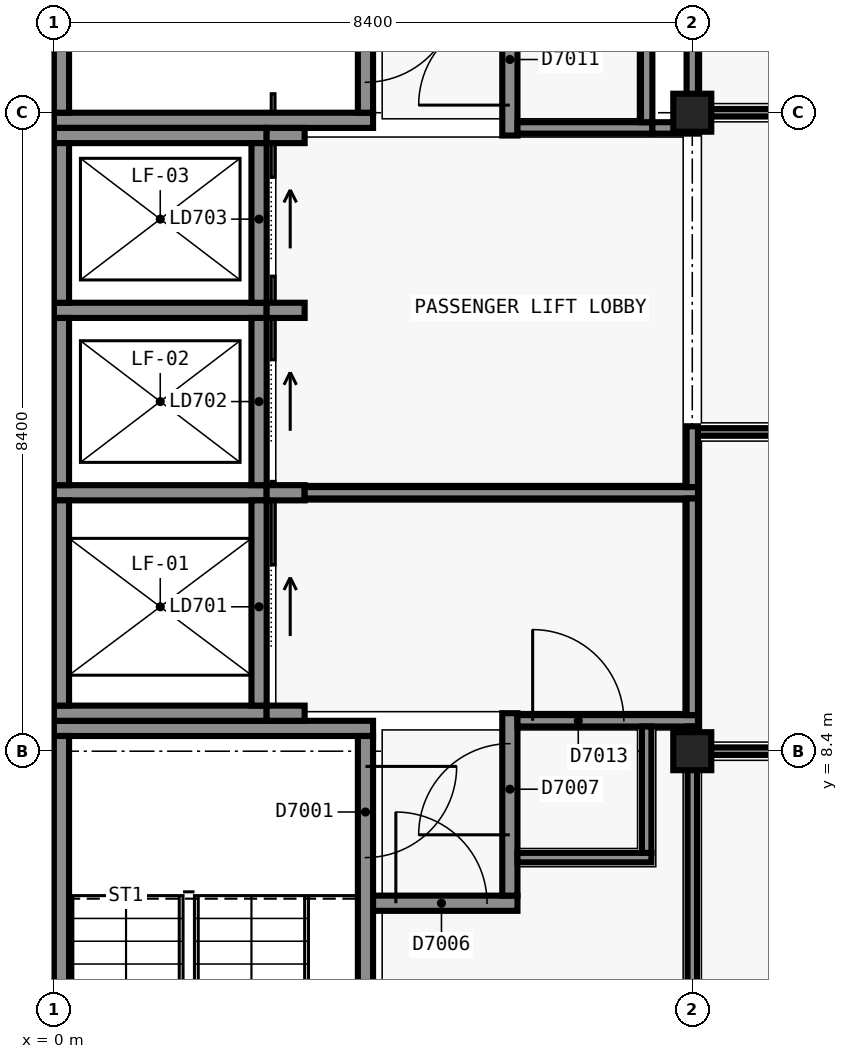
"""IFC4 building model, lengths in metres.
Left out: names, types, materials, properties, quantities, classifications, styles, units other than length and angle.
Written with IfcOpenShell. Run it as: python <this file> out.ifc"""

import sys

from ifc_helpers import new_model, si_unit, direction, frame, frame_2d, origin, origin_2d, place, context, subcontext, project, spatial, rectangle, extrude, element, fill, save


model = new_model("IFC4")
c1 = context("Model", 3, precision=1e-05, world=origin(), true_north=direction((0.0, 1.0)))
c2 = subcontext(c1, "Body", "Model", "MODEL_VIEW")
j1 = project(units=[si_unit("LENGTHUNIT", "METRE"), si_unit("PLANEANGLEUNIT", "RADIAN")], contexts=[c1])
p1 = place(None, origin())
s1 = spatial("IfcSite", under=j1, at=p1, CompositionType="ELEMENT")
p2 = place(p1, origin())
s2 = spatial("IfcBuilding", under=s1, at=p2, CompositionType="ELEMENT")
p3 = place(p2, frame((0.0, 0.0, 33.6)))
s3 = spatial("IfcBuildingStorey", under=s2, at=p3, CompositionType="ELEMENT", Elevation=33.6)
p4 = place(p3, frame((0.0, 8.7, 0.0), z_axis=(0.0, 0.0, 1.0), x_axis=(1.0, 0.0, 0.0)))
e1 = element("IfcWall", 1, at=p4, inside=s3, PredefinedType="SHEAR", context=c2, shape_type="SweptSolid", body=[
    extrude(rectangle(XDim=4.199, YDim=0.2, at=frame_2d((2.1, 0.0))), origin(), (0.0, 0.0, 1.0), 4.5),
])
p5 = place(p3, frame((0.1, 0.2, 0.0), z_axis=(0.0, 0.0, 1.0), x_axis=(0.0, 1.0, 0.0)))
e2 = element("IfcWall", 2, at=p5, inside=s3, PredefinedType="SHEAR", context=c2, shape_type="SweptSolid", body=[
    extrude(rectangle(XDim=8.4, YDim=0.2, at=frame_2d((4.2, 0.0))), origin(), (0.0, 0.0, 1.0), 4.5),
])
p6 = place(p3, frame((4.1, 8.6, 0.0), z_axis=(0.0, 0.0, 1.0), x_axis=(0.0, -1.0, 0.0)))
e3 = element("IfcWall", 3, at=p6, inside=s3, PredefinedType="SHEAR", context=c2, shape_type="SweptSolid", body=[
    extrude(rectangle(XDim=8.4, YDim=0.2, at=frame_2d((4.2, 0.0))), origin(), (0.0, 0.0, 1.0), 4.5),
])
p7 = place(p6, frame((0.4, 0.0, 0.0)))
e4 = element("IfcOpeningElement", 4, at=p7, cuts=e3, PredefinedType="OPENING", context=c2, shape_type="SweptSolid", body=[
    extrude(rectangle(XDim=1.2, YDim=2.1, at=frame_2d((0.6, 1.05))), frame((0.0, 0.11, 0.0), z_axis=(0.0, -1.0, 0.0), x_axis=(1.0, 0.0, 0.0)), (0.0, 0.0, 1.0), 0.22),
])
p8 = place(p3, frame((4.2, 16.7, 0.0), z_axis=(0.0, 0.0, 1.0), x_axis=(-1.0, 0.0, 0.0)))
e5 = element("IfcWall", 5, at=p8, inside=s3, PredefinedType="SHEAR", context=c2, shape_type="SweptSolid", body=[
    extrude(rectangle(XDim=4.199, YDim=0.2, at=frame_2d((2.1, 0.0))), origin(), (0.0, 0.0, 1.0), 4.5),
])
p9 = place(p3, frame((0.1, 16.8, 0.0), z_axis=(0.0, 0.0, 1.0), x_axis=(0.0, 1.0, 0.0)))
e6 = element("IfcWall", 6, at=p9, inside=s3, PredefinedType="SHEAR", context=c2, shape_type="SweptSolid", body=[
    extrude(rectangle(XDim=8.2, YDim=0.2, at=frame_2d((4.1, 0.0))), origin(), (0.0, 0.0, 1.0), 4.5),
])
p10 = place(p3, frame((4.1, 25.0, 0.0), z_axis=(0.0, 0.0, 1.0), x_axis=(0.0, -1.0, 0.0)))
e7 = element("IfcWall", 7, at=p10, inside=s3, PredefinedType="SHEAR", context=c2, shape_type="SweptSolid", body=[
    extrude(rectangle(XDim=8.2, YDim=0.2, at=frame_2d((4.1, 0.0))), origin(), (0.0, 0.0, 1.0), 4.5),
])
p11 = place(p10, frame((6.6, 0.0, 0.0)))
e8 = element("IfcOpeningElement", 8, at=p11, cuts=e7, PredefinedType="OPENING", context=c2, shape_type="SweptSolid", body=[
    extrude(rectangle(XDim=1.2, YDim=2.1, at=frame_2d((0.6, 1.05))), frame((0.0, 0.11, 0.0), z_axis=(0.0, -1.0, 0.0), x_axis=(1.0, 0.0, 0.0)), (0.0, 0.0, 1.0), 0.22),
])
for number, where, z_axis, x_axis in (
    (9, (2.8, 8.9, 0.0), (0.0, 0.0, 1.0), (-1.0, 0.0, 0.0)),
    (10, (0.0, 11.8, 0.0), (0.0, 0.0, 1.0), (1.0, 0.0, 0.0)),
):
    element("IfcWall", number, at=place(p3, frame(where, z_axis=z_axis, x_axis=x_axis)), inside=s3, PredefinedType="SHEAR", context=c2, shape_type="SweptSolid", body=[
        extrude(rectangle(XDim=2.8, YDim=0.2, at=frame_2d((1.4, 0.0))), origin(), (0.0, 0.0, 1.0), 4.5),
    ])
p12 = place(p3, frame((0.1, 9.0, 0.0), z_axis=(0.0, 0.0, 1.0), x_axis=(0.0, 1.0, 0.0)))
e11 = element("IfcWall", 11, at=p12, inside=s3, PredefinedType="SHEAR", context=c2, shape_type="SweptSolid", body=[
    extrude(rectangle(XDim=2.7, YDim=0.2, at=frame_2d((1.35, 0.0))), origin(), (0.0, 0.0, 1.0), 4.5),
])
p13 = place(p3, frame((2.7, 11.7, 0.0), z_axis=(0.0, 0.0, 1.0), x_axis=(0.0, -1.0, 0.0)))
e12 = element("IfcWall", 12, at=p13, inside=s3, PredefinedType="SHEAR", context=c2, shape_type="SweptSolid", body=[
    extrude(rectangle(XDim=2.7, YDim=0.2, at=frame_2d((1.35, 0.0))), origin(), (0.0, 0.0, 1.0), 4.5),
])
p14 = place(p13, frame((0.85, 0.0, 0.0)))
e13 = element("IfcOpeningElement", 13, at=p14, cuts=e12, PredefinedType="OPENING", context=c2, shape_type="SweptSolid", body=[
    extrude(rectangle(XDim=1.1, YDim=2.1, at=frame_2d((0.55, 1.05))), frame((0.0, 0.11, 0.0), z_axis=(0.0, -1.0, 0.0), x_axis=(1.0, 0.0, 0.0)), (0.0, 0.0, 1.0), 0.22),
])
p15 = place(p3, frame((0.0, 14.2, 0.0), z_axis=(0.0, 0.0, 1.0), x_axis=(1.0, 0.0, 0.0)))
e14 = element("IfcWall", 14, at=p15, inside=s3, PredefinedType="SHEAR", context=c2, shape_type="SweptSolid", body=[
    extrude(rectangle(XDim=2.8, YDim=0.2, at=frame_2d((1.4, 0.0))), origin(), (0.0, 0.0, 1.0), 4.5),
])
p16 = place(p3, frame((0.1, 11.9, 0.0), z_axis=(0.0, 0.0, 1.0), x_axis=(0.0, 1.0, 0.0)))
e15 = element("IfcWall", 15, at=p16, inside=s3, PredefinedType="SHEAR", context=c2, shape_type="SweptSolid", body=[
    extrude(rectangle(XDim=2.2, YDim=0.2, at=frame_2d((1.1, 0.0))), origin(), (0.0, 0.0, 1.0), 4.5),
])
p17 = place(p3, frame((2.7, 14.1, 0.0), z_axis=(0.0, 0.0, 1.0), x_axis=(0.0, -1.0, 0.0)))
e16 = element("IfcWall", 16, at=p17, inside=s3, PredefinedType="SHEAR", context=c2, shape_type="SweptSolid", body=[
    extrude(rectangle(XDim=2.2, YDim=0.2, at=frame_2d((1.1, 0.0))), origin(), (0.0, 0.0, 1.0), 4.5),
])
p18 = place(p17, frame((0.55, 0.0, 0.0)))
e17 = element("IfcOpeningElement", 17, at=p18, cuts=e16, PredefinedType="OPENING", context=c2, shape_type="SweptSolid", body=[
    extrude(rectangle(XDim=1.1, YDim=2.1, at=frame_2d((0.55, 1.05))), frame((0.0, 0.11, 0.0), z_axis=(0.0, -1.0, 0.0), x_axis=(1.0, 0.0, 0.0)), (0.0, 0.0, 1.0), 0.22),
])
p19 = place(p3, frame((0.0, 16.5, 0.0), z_axis=(0.0, 0.0, 1.0), x_axis=(1.0, 0.0, 0.0)))
e18 = element("IfcWall", 18, at=p19, inside=s3, PredefinedType="SHEAR", context=c2, shape_type="SweptSolid", body=[
    extrude(rectangle(XDim=2.8, YDim=0.2, at=frame_2d((1.4, 0.0))), origin(), (0.0, 0.0, 1.0), 4.5),
])
p20 = place(p3, frame((0.1, 14.3, 0.0), z_axis=(0.0, 0.0, 1.0), x_axis=(0.0, 1.0, 0.0)))
e19 = element("IfcWall", 19, at=p20, inside=s3, PredefinedType="SHEAR", context=c2, shape_type="SweptSolid", body=[
    extrude(rectangle(XDim=2.1, YDim=0.2, at=frame_2d((1.05, 0.0))), origin(), (0.0, 0.0, 1.0), 4.5),
])
p21 = place(p3, frame((2.7, 16.4, 0.0), z_axis=(0.0, 0.0, 1.0), x_axis=(0.0, -1.0, 0.0)))
e20 = element("IfcWall", 20, at=p21, inside=s3, PredefinedType="SHEAR", context=c2, shape_type="SweptSolid", body=[
    extrude(rectangle(XDim=2.1, YDim=0.2, at=frame_2d((1.05, 0.0))), origin(), (0.0, 0.0, 1.0), 4.5),
])
p22 = place(p21, frame((0.45, 0.0, 0.0)))
e21 = element("IfcOpeningElement", 21, at=p22, cuts=e20, PredefinedType="OPENING", context=c2, shape_type="SweptSolid", body=[
    extrude(rectangle(XDim=1.1, YDim=2.1, at=frame_2d((0.55, 1.05))), frame((0.0, 0.11, 0.0), z_axis=(0.0, -1.0, 0.0), x_axis=(1.0, 0.0, 0.0)), (0.0, 0.0, 1.0), 0.22),
])
for number, where, z_axis, x_axis in (
    (22, (8.4, 8.4, 0.0), (0.0, 0.0, 1.0), (1.0, 0.0, 0.0)),
    (23, (8.4, 16.8, 0.0), (0.0, 0.0, 1.0), (1.0, 0.0, 0.0)),
):
    element("IfcColumn", number, at=place(p3, frame(where, z_axis=z_axis, x_axis=x_axis)), inside=s3, PredefinedType="COLUMN", context=c2, shape_type="SweptSolid", body=[
        extrude(rectangle(XDim=0.5, YDim=0.5, at=origin_2d()), origin(), (0.0, 0.0, 1.0), 4.5),
    ])
for number, where, z_axis, x_axis in (
    (24, (3.3, 8.9, 0.0), (0.0, 0.0, 1.0), (-1.0, 0.0, 0.0)),
    (25, (2.8, 11.8, 0.0), (0.0, 0.0, 1.0), (1.0, 0.0, 0.0)),
    (26, (2.8, 14.2, 0.0), (0.0, 0.0, 1.0), (1.0, 0.0, 0.0)),
    (27, (2.8, 16.5, 0.0), (0.0, 0.0, 1.0), (1.0, 0.0, 0.0)),
):
    element("IfcWall", number, at=place(p3, frame(where, z_axis=z_axis, x_axis=x_axis)), inside=s3, PredefinedType="SHEAR", context=c2, shape_type="SweptSolid", body=[
        extrude(rectangle(XDim=0.5, YDim=0.2, at=frame_2d((0.25, 0.0))), origin(), (0.0, 0.0, 1.0), 4.5),
    ])
p23 = place(p3, frame((4.2, 6.4, 0.0), z_axis=(0.0, 0.0, 1.0), x_axis=(1.0, 0.0, 0.0)))
e28 = element("IfcWall", 28, at=p23, inside=s3, PredefinedType="SOLIDWALL", context=c2, shape_type="SweptSolid", body=[
    extrude(rectangle(XDim=1.9, YDim=0.2, at=frame_2d((0.95, 0.0))), origin(), (0.0, 0.0, 1.0), 4.2),
])
p24 = place(p23, frame((0.3, 0.0, 0.0)))
e29 = element("IfcOpeningElement", 29, at=p24, cuts=e28, PredefinedType="OPENING", context=c2, shape_type="SweptSolid", body=[
    extrude(rectangle(XDim=1.2, YDim=2.1, at=frame_2d((0.6, 1.05))), frame((0.0, 0.11, 0.0), z_axis=(0.0, -1.0, 0.0), x_axis=(1.0, 0.0, 0.0)), (0.0, 0.0, 1.0), 0.22),
])
p25 = place(p3, frame((6.0, 6.5, 0.0), z_axis=(0.0, 0.0, 1.0), x_axis=(0.0, 1.0, 0.0)))
e30 = element("IfcWall", 30, at=p25, inside=s3, PredefinedType="SOLIDWALL", context=c2, shape_type="SweptSolid", body=[
    extrude(rectangle(XDim=2.4, YDim=0.2, at=frame_2d((1.2, 0.0))), origin(), (0.0, 0.0, 1.0), 3.7),
])
p26 = place(p25, frame((0.8, 0.0, 0.0)))
e31 = element("IfcOpeningElement", 31, at=p26, cuts=e30, PredefinedType="OPENING", context=c2, shape_type="SweptSolid", body=[
    extrude(rectangle(XDim=1.2, YDim=2.1, at=frame_2d((0.6, 1.05))), frame((0.0, 0.11, 0.0), z_axis=(0.0, -1.0, 0.0), x_axis=(1.0, 0.0, 0.0)), (0.0, 0.0, 1.0), 0.22),
])
p27 = place(p3, frame((6.0, 16.5, 0.0), z_axis=(0.0, 0.0, 1.0), x_axis=(0.0, 1.0, 0.0)))
e32 = element("IfcWall", 32, at=p27, inside=s3, PredefinedType="SOLIDWALL", context=c2, shape_type="SweptSolid", body=[
    extrude(rectangle(XDim=2.4, YDim=0.2, at=frame_2d((1.2, 0.0))), origin(), (0.0, 0.0, 1.0), 3.7),
])
p28 = place(p27, frame((0.4, 0.0, 0.0)))
e33 = element("IfcOpeningElement", 33, at=p28, cuts=e32, PredefinedType="OPENING", context=c2, shape_type="SweptSolid", body=[
    extrude(rectangle(XDim=1.2, YDim=2.1, at=frame_2d((0.6, 1.05))), frame((0.0, 0.11, 0.0), z_axis=(0.0, -1.0, 0.0), x_axis=(1.0, 0.0, 0.0)), (0.0, 0.0, 1.0), 0.22),
])
p29 = place(p3, frame((6.1, 16.6, 0.0), z_axis=(0.0, 0.0, 1.0), x_axis=(1.0, 0.0, 0.0)))
e34 = element("IfcWall", 34, at=p29, inside=s3, PredefinedType="PARTITIONING", context=c2, shape_type="SweptSolid", body=[
    extrude(rectangle(XDim=1.775, YDim=0.15, at=frame_2d((0.887, 0.0))), origin(), (0.0, 0.0, 1.0), 3.7),
])
p30 = place(p3, frame((6.1, 8.8, 0.0), z_axis=(0.0, 0.0, 1.0), x_axis=(1.0, 0.0, 0.0)))
e35 = element("IfcWall", 35, at=p30, inside=s3, PredefinedType="SOLIDWALL", context=c2, shape_type="SweptSolid", body=[
    extrude(rectangle(XDim=2.375, YDim=0.15, at=frame_2d((1.188, 0.0))), origin(), (0.0, 0.0, 1.0), 3.5),
])
p31 = place(p30, frame((0.2, 0.0, 0.0)))
e36 = element("IfcOpeningElement", 36, at=p31, cuts=e35, PredefinedType="OPENING", context=c2, shape_type="SweptSolid", body=[
    extrude(rectangle(XDim=1.2, YDim=2.1, at=frame_2d((0.6, 1.05))), frame((0.0, 0.085, 0.0), z_axis=(0.0, -1.0, 0.0), x_axis=(1.0, 0.0, 0.0)), (0.0, 0.0, 1.0), 0.17),
])
p32 = place(p3, frame((3.3, 11.8, 0.0), z_axis=(0.0, 0.0, 1.0), x_axis=(1.0, 0.0, 0.0)))
e37 = element("IfcWall", 37, at=p32, inside=s3, PredefinedType="SOLIDWALL", context=c2, shape_type="SweptSolid", body=[
    extrude(rectangle(XDim=5.175, YDim=0.15, at=frame_2d((2.587, 0.0))), origin(), (0.0, 0.0, 1.0), 3.5),
])
p33 = place(p3, frame((7.875, 16.6, 0.0), z_axis=(0.0, 0.0, 1.0), x_axis=(1.0, 0.0, 0.0)))
e38 = element("IfcWall", 38, at=p33, inside=s3, PredefinedType="SOLIDWALL", context=c2, shape_type="SweptSolid", body=[
    extrude(rectangle(XDim=0.6, YDim=0.15, at=frame_2d((0.3, 0.0))), origin(), (0.0, 0.0, 1.0), 3.5),
])
p34 = place(p3, frame((8.4, 11.875, 0.0), z_axis=(0.0, 0.0, 1.0), x_axis=(0.0, 1.0, 0.0)))
e39 = element("IfcWall", 39, at=p34, inside=s3, PredefinedType="PARTITIONING", context=c2, shape_type="SweptSolid", body=[
    extrude(rectangle(XDim=0.8, YDim=0.15, at=frame_2d((0.4, 0.0))), origin(), (0.0, 0.0, 1.0), 3.5),
])
p35 = place(p3, frame((8.4, 8.875, 0.0), z_axis=(0.0, 0.0, 1.0), x_axis=(0.0, 1.0, 0.0)))
e40 = element("IfcWall", 40, at=p35, inside=s3, PredefinedType="SOLIDWALL", context=c2, shape_type="SweptSolid", body=[
    extrude(rectangle(XDim=2.85, YDim=0.15, at=frame_2d((1.425, 0.0))), origin(), (0.0, 0.0, 1.0), 3.5),
])
p36 = place(p3, frame((7.8, 16.675, 0.0), z_axis=(0.0, 0.0, 1.0), x_axis=(0.0, 1.0, 0.0)))
e41 = element("IfcWall", 41, at=p36, inside=s3, PredefinedType="SOLIDWALL", context=c2, shape_type="SweptSolid", body=[
    extrude(rectangle(XDim=1.65, YDim=0.15, at=frame_2d((0.825, 0.0))), origin(), (0.0, 0.0, 1.0), 3.7),
])
p37 = place(p3, frame((8.4, 16.675, 0.0), z_axis=(0.0, 0.0, 1.0), x_axis=(0.0, 1.0, 0.0)))
e42 = element("IfcWall", 42, at=p37, inside=s3, PredefinedType="SOLIDWALL", context=c2, shape_type="SweptSolid", body=[
    extrude(rectangle(XDim=7.775, YDim=0.15, at=frame_2d((3.887, 0.0))), origin(), (0.0, 0.0, 1.0), 3.5),
])
p38 = place(p3, frame((6.1, 7.0, 0.0), z_axis=(0.0, 0.0, 1.0), x_axis=(1.0, 0.0, 0.0)))
e43 = element("IfcWall", 43, at=p38, inside=s3, PredefinedType="PARTITIONING", context=c2, shape_type="SweptSolid", body=[
    extrude(rectangle(XDim=1.762, YDim=0.125, at=frame_2d((0.881, 0.0))), origin(), (0.0, 0.0, 1.0), 4.2),
])
p39 = place(p3, frame((7.8, 7.062, 0.0), z_axis=(0.0, 0.0, 1.0), x_axis=(0.0, 1.0, 0.0)))
e44 = element("IfcWall", 44, at=p39, inside=s3, PredefinedType="PARTITIONING", context=c2, shape_type="SweptSolid", body=[
    extrude(rectangle(XDim=1.663, YDim=0.125, at=frame_2d((0.831, 0.0))), origin(), (0.0, 0.0, 1.0), 3.7),
])
p40 = place(p3, frame((8.4, 0.75, 0.0), z_axis=(0.0, 0.0, 1.0), x_axis=(0.0, 1.0, 0.0)))
e45 = element("IfcWall", 45, at=p40, inside=s3, PredefinedType="PARTITIONING", context=c2, shape_type="SweptSolid", body=[
    extrude(rectangle(XDim=7.975, YDim=0.125, at=frame_2d((3.988, 0.0))), origin(), (0.0, 0.0, 1.0), 3.5),
])
p41 = place(p3, frame((8.462, 8.4, 0.0), z_axis=(0.0, 0.0, 1.0), x_axis=(1.0, 0.0, 0.0)))
e46 = element("IfcWall", 46, at=p41, inside=s3, PredefinedType="PARTITIONING", context=c2, shape_type="SweptSolid", body=[
    extrude(rectangle(XDim=16.663, YDim=0.1, at=frame_2d((8.331, 0.0))), origin(), (0.0, 0.0, 1.0), 3.5),
])
p42 = place(p41, frame((3.637, 0.0, 0.0)))
e47 = element("IfcOpeningElement", 47, at=p42, cuts=e46, PredefinedType="OPENING", context=c2, shape_type="SweptSolid", body=[
    extrude(rectangle(XDim=1.0, YDim=2.1, at=frame_2d((0.5, 1.05))), frame((0.0, 0.06, 0.0), z_axis=(0.0, -1.0, 0.0), x_axis=(1.0, 0.0, 0.0)), (0.0, 0.0, 1.0), 0.12),
])
p43 = place(p3, frame((8.475, 12.6, 0.0), z_axis=(0.0, 0.0, 1.0), x_axis=(1.0, 0.0, 0.0)))
e48 = element("IfcWall", 48, at=p43, inside=s3, PredefinedType="PARTITIONING", context=c2, shape_type="SweptSolid", body=[
    extrude(rectangle(XDim=16.65, YDim=0.1, at=frame_2d((8.325, 0.0))), origin(), (0.0, 0.0, 1.0), 3.5),
])
p44 = place(p3, frame((8.475, 16.8, 0.0), z_axis=(0.0, 0.0, 1.0), x_axis=(1.0, 0.0, 0.0)))
e49 = element("IfcWall", 49, at=p44, inside=s3, PredefinedType="PARTITIONING", context=c2, shape_type="SweptSolid", body=[
    extrude(rectangle(XDim=16.65, YDim=0.1, at=frame_2d((8.325, 0.0))), origin(), (0.0, 0.0, 1.0), 3.5),
])
p45 = place(p44, frame((5.725, 0.0, 0.0)))
e50 = element("IfcOpeningElement", 50, at=p45, cuts=e49, PredefinedType="OPENING", context=c2, shape_type="SweptSolid", body=[
    extrude(rectangle(XDim=1.0, YDim=2.1, at=frame_2d((0.5, 1.05))), frame((0.0, 0.06, 0.0), z_axis=(0.0, -1.0, 0.0), x_axis=(1.0, 0.0, 0.0)), (0.0, 0.0, 1.0), 0.12),
])
p46 = place(p14, origin())
e51 = element("IfcDoor", 51, at=p46, inside=s3, OperationType="SLIDING_TO_LEFT", PredefinedType="DOOR", context=c2, shape_type="SweptSolid", body=[
    extrude(rectangle(XDim=1.1, YDim=2.1, at=frame_2d((0.55, 1.05))), frame((0.0, 0.025, 0.0), z_axis=(0.0, -1.0, 0.0), x_axis=(1.0, 0.0, 0.0)), (0.0, 0.0, 1.0), 0.05),
])
fill(e13, e51)
p47 = place(p18, origin())
e52 = element("IfcDoor", 52, at=p47, inside=s3, OperationType="SLIDING_TO_LEFT", PredefinedType="DOOR", context=c2, shape_type="SweptSolid", body=[
    extrude(rectangle(XDim=1.1, YDim=2.1, at=frame_2d((0.55, 1.05))), frame((0.0, 0.025, 0.0), z_axis=(0.0, -1.0, 0.0), x_axis=(1.0, 0.0, 0.0)), (0.0, 0.0, 1.0), 0.05),
])
fill(e17, e52)
p48 = place(p22, origin())
e53 = element("IfcDoor", 53, at=p48, inside=s3, OperationType="SLIDING_TO_LEFT", PredefinedType="DOOR", context=c2, shape_type="SweptSolid", body=[
    extrude(rectangle(XDim=1.1, YDim=2.1, at=frame_2d((0.55, 1.05))), frame((0.0, 0.025, 0.0), z_axis=(0.0, -1.0, 0.0), x_axis=(1.0, 0.0, 0.0)), (0.0, 0.0, 1.0), 0.05),
])
fill(e21, e53)
p49 = place(p7, origin())
e54 = element("IfcDoor", 54, at=p49, inside=s3, OperationType="SINGLE_SWING_RIGHT", PredefinedType="DOOR", context=c2, shape_type="SweptSolid", body=[
    extrude(rectangle(XDim=1.2, YDim=2.1, at=frame_2d((0.6, 1.05))), frame((0.0, 0.025, 0.0), z_axis=(0.0, -1.0, 0.0), x_axis=(1.0, 0.0, 0.0)), (0.0, 0.0, 1.0), 0.05),
])
fill(e4, e54)
p50 = place(p11, origin())
e55 = element("IfcDoor", 55, at=p50, inside=s3, OperationType="SINGLE_SWING_RIGHT", PredefinedType="DOOR", context=c2, shape_type="SweptSolid", body=[
    extrude(rectangle(XDim=1.2, YDim=2.1, at=frame_2d((0.6, 1.05))), frame((0.0, 0.025, 0.0), z_axis=(0.0, -1.0, 0.0), x_axis=(1.0, 0.0, 0.0)), (0.0, 0.0, 1.0), 0.05),
])
fill(e8, e55)
p51 = place(p24, origin())
e56 = element("IfcDoor", 56, at=p51, inside=s3, OperationType="SINGLE_SWING_LEFT", PredefinedType="DOOR", context=c2, shape_type="SweptSolid", body=[
    extrude(rectangle(XDim=1.2, YDim=2.1, at=frame_2d((0.6, 1.05))), frame((0.0, 0.025, 0.0), z_axis=(0.0, -1.0, 0.0), x_axis=(1.0, 0.0, 0.0)), (0.0, 0.0, 1.0), 0.05),
])
fill(e29, e56)
p52 = place(p26, origin())
e57 = element("IfcDoor", 57, at=p52, inside=s3, OperationType="SINGLE_SWING_RIGHT", PredefinedType="DOOR", context=c2, shape_type="SweptSolid", body=[
    extrude(rectangle(XDim=1.2, YDim=2.1, at=frame_2d((0.6, 1.05))), frame((0.0, 0.025, 0.0), z_axis=(0.0, -1.0, 0.0), x_axis=(1.0, 0.0, 0.0)), (0.0, 0.0, 1.0), 0.05),
])
fill(e31, e57)
p53 = place(p28, origin())
e58 = element("IfcDoor", 58, at=p53, inside=s3, OperationType="SINGLE_SWING_RIGHT", PredefinedType="DOOR", context=c2, shape_type="SweptSolid", body=[
    extrude(rectangle(XDim=1.2, YDim=2.1, at=frame_2d((0.6, 1.05))), frame((0.0, 0.025, 0.0), z_axis=(0.0, -1.0, 0.0), x_axis=(1.0, 0.0, 0.0)), (0.0, 0.0, 1.0), 0.05),
])
fill(e33, e58)
p54 = place(p31, origin())
e59 = element("IfcDoor", 59, at=p54, inside=s3, OperationType="SINGLE_SWING_RIGHT", PredefinedType="DOOR", context=c2, shape_type="SweptSolid", body=[
    extrude(rectangle(XDim=1.2, YDim=2.1, at=frame_2d((0.6, 1.05))), frame((0.0, 0.025, 0.0), z_axis=(0.0, -1.0, 0.0), x_axis=(1.0, 0.0, 0.0)), (0.0, 0.0, 1.0), 0.05),
])
fill(e36, e59)
save(model, sys.argv[1])
